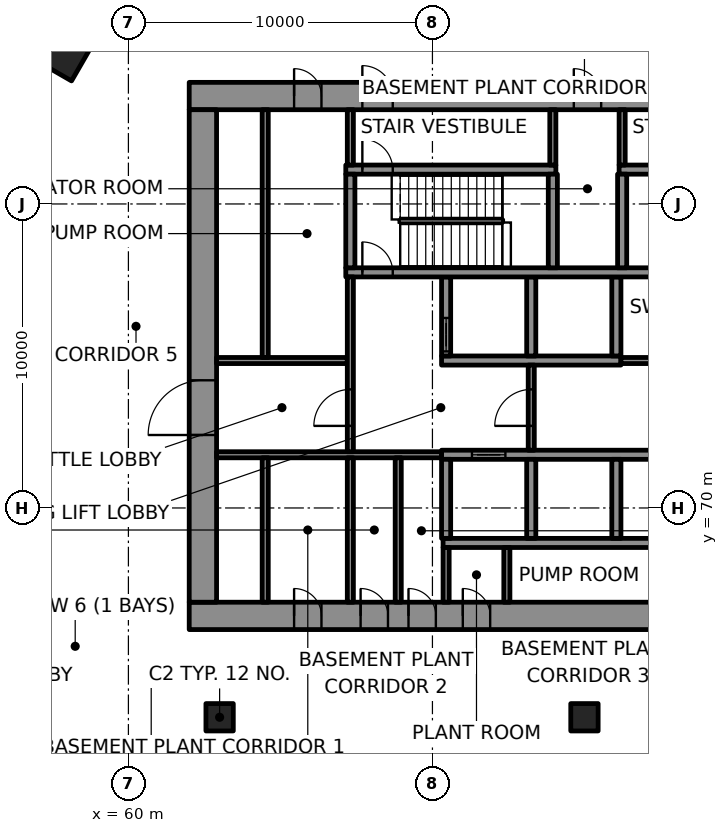
"""IFC4 building model, lengths in metres.
Left out: names, types, materials, properties, quantities, classifications, styles, units other than length and angle.
Written with IfcOpenShell. Run it as: python <this file> out.ifc"""

import sys

from ifc_helpers import new_model, si_unit, direction, frame, frame_2d, origin, origin_2d, place, context, subcontext, project, spatial, rectangle, extrude, element, fill, save


model = new_model("IFC4")
c1 = context("Model", 3, precision=1e-05, world=origin(), true_north=direction((0.0, 1.0)))
c2 = subcontext(c1, "Body", "Model", "MODEL_VIEW")
j1 = project(units=[si_unit("LENGTHUNIT", "METRE"), si_unit("PLANEANGLEUNIT", "RADIAN")], contexts=[c1])
p1 = place(None, origin())
s1 = spatial("IfcSite", under=j1, at=p1, CompositionType="ELEMENT")
p2 = place(p1, origin())
s2 = spatial("IfcBuilding", under=s1, at=p2, CompositionType="ELEMENT")
p3 = place(p2, frame((0.0, 0.0, -9.5)))
s3 = spatial("IfcBuildingStorey", under=s2, at=p3, CompositionType="ELEMENT", Elevation=-9.5)
p4 = place(p3, frame((67.936, 110.334, -0.35), z_axis=(0.0, 0.0, 1.0), x_axis=(-0.499999089162, -0.866025929656, 0.0)))
e1 = element("IfcWall", 1, at=p4, inside=s3, PredefinedType="SOLIDWALL", context=c2, shape_type="SweptSolid", body=[
    extrude(rectangle(XDim=53.501, YDim=0.6, at=frame_2d((26.751, 0.0))), origin(), (0.0, 0.0, 1.0), 4.5),
])
p5 = place(p3, frame((57.78, 84.942, 0.0), z_axis=(0.0, 0.0, 1.0), x_axis=(-0.5, -0.866025403784, 0.0)))
e2 = element("IfcColumn", 2, at=p5, inside=s3, PredefinedType="COLUMN", context=c2, shape_type="SweptSolid", body=[
    extrude(rectangle(XDim=1.2, YDim=1.5, at=origin_2d()), origin(), (0.0, 0.0, 1.0), 4.5),
])
for number, where, z_axis, x_axis in (
    (3, (63.0, 63.115, 0.0), (0.0, 0.0, 1.0), (1.0, 0.0, 0.0)),
    (4, (75.0, 63.115, 0.0), (0.0, 0.0, 1.0), (1.0, 0.0, 0.0)),
):
    element("IfcColumn", number, at=place(p3, frame(where, z_axis=z_axis, x_axis=x_axis)), inside=s3, PredefinedType="COLUMN", context=c2, shape_type="SweptSolid", body=[
        extrude(rectangle(XDim=0.9, YDim=0.9, at=origin_2d()), origin(), (0.0, 0.0, 1.0), 4.5),
    ])
p6 = place(p3, frame((62.0, 66.45, 0.0), z_axis=(0.0, 0.0, 1.0), x_axis=(1.0, 0.0, 0.0)))
e5 = element("IfcWall", 5, at=p6, inside=s3, PredefinedType="SHEAR", context=c2, shape_type="SweptSolid", body=[
    extrude(rectangle(XDim=26.0, YDim=0.9, at=frame_2d((13.0, 0.0))), origin(), (0.0, 0.0, 1.0), 4.15),
])
p7 = place(p6, frame((3.45, 0.0, 0.0)))
e6 = element("IfcOpeningElement", 6, at=p7, cuts=e5, PredefinedType="OPENING", context=c2, shape_type="SweptSolid", body=[
    extrude(rectangle(XDim=0.9, YDim=2.1, at=frame_2d((0.45, 1.05))), frame((0.0, 0.46, 0.0), z_axis=(0.0, -1.0, 0.0), x_axis=(1.0, 0.0, 0.0)), (0.0, 0.0, 1.0), 0.92),
])
p8 = place(p6, frame((5.637, 0.0, 0.0)))
e7 = element("IfcOpeningElement", 7, at=p8, cuts=e5, PredefinedType="OPENING", context=c2, shape_type="SweptSolid", body=[
    extrude(rectangle(XDim=0.9, YDim=2.1, at=frame_2d((0.45, 1.05))), frame((0.0, 0.46, 0.0), z_axis=(0.0, -1.0, 0.0), x_axis=(1.0, 0.0, 0.0)), (0.0, 0.0, 1.0), 0.92),
])
p9 = place(p6, frame((7.212, 0.0, 0.0)))
e8 = element("IfcOpeningElement", 8, at=p9, cuts=e5, PredefinedType="OPENING", context=c2, shape_type="SweptSolid", body=[
    extrude(rectangle(XDim=0.9, YDim=2.1, at=frame_2d((0.45, 1.05))), frame((0.0, 0.46, 0.0), z_axis=(0.0, -1.0, 0.0), x_axis=(1.0, 0.0, 0.0)), (0.0, 0.0, 1.0), 0.92),
])
p10 = place(p6, frame((8.999, 0.0, 0.0)))
e9 = element("IfcOpeningElement", 9, at=p10, cuts=e5, PredefinedType="OPENING", context=c2, shape_type="SweptSolid", body=[
    extrude(rectangle(XDim=0.9, YDim=2.1, at=frame_2d((0.45, 1.05))), frame((0.0, 0.46, 0.0), z_axis=(0.0, -1.0, 0.0), x_axis=(1.0, 0.0, 0.0)), (0.0, 0.0, 1.0), 0.92),
])
p11 = place(p6, frame((17.324, 0.0, 0.0)))
e10 = element("IfcOpeningElement", 10, at=p11, cuts=e5, PredefinedType="OPENING", context=c2, shape_type="SweptSolid", body=[
    extrude(rectangle(XDim=0.9, YDim=2.1, at=frame_2d((0.45, 1.05))), frame((0.0, 0.46, 0.0), z_axis=(0.0, -1.0, 0.0), x_axis=(1.0, 0.0, 0.0)), (0.0, 0.0, 1.0), 0.92),
])
p12 = place(p3, frame((62.0, 83.55, 0.0), z_axis=(0.0, 0.0, 1.0), x_axis=(1.0, 0.0, 0.0)))
e11 = element("IfcWall", 11, at=p12, inside=s3, PredefinedType="SHEAR", context=c2, shape_type="SweptSolid", body=[
    extrude(rectangle(XDim=26.0, YDim=0.9, at=frame_2d((13.0, 0.0))), origin(), (0.0, 0.0, 1.0), 4.15),
])
p13 = place(p12, frame((5.695, 0.0, 0.0)))
e12 = element("IfcOpeningElement", 12, at=p13, cuts=e11, PredefinedType="OPENING", context=c2, shape_type="SweptSolid", body=[
    extrude(rectangle(XDim=1.0, YDim=2.1, at=frame_2d((0.5, 1.05))), frame((0.0, 0.46, 0.0), z_axis=(0.0, -1.0, 0.0), x_axis=(1.0, 0.0, 0.0)), (0.0, 0.0, 1.0), 0.92),
])
p14 = place(p12, frame((19.505, 0.0, 0.0)))
e13 = element("IfcOpeningElement", 13, at=p14, cuts=e11, PredefinedType="OPENING", context=c2, shape_type="SweptSolid", body=[
    extrude(rectangle(XDim=1.0, YDim=2.1, at=frame_2d((0.5, 1.05))), frame((0.0, 0.46, 0.0), z_axis=(0.0, -1.0, 0.0), x_axis=(1.0, 0.0, 0.0)), (0.0, 0.0, 1.0), 0.92),
])
p15 = place(p12, frame((3.45, 0.0, 0.0)))
e14 = element("IfcOpeningElement", 14, at=p15, cuts=e11, PredefinedType="OPENING", context=c2, shape_type="SweptSolid", body=[
    extrude(rectangle(XDim=0.9, YDim=2.1, at=frame_2d((0.45, 1.05))), frame((0.0, 0.46, 0.0), z_axis=(0.0, -1.0, 0.0), x_axis=(1.0, 0.0, 0.0)), (0.0, 0.0, 1.0), 0.92),
])
p16 = place(p12, frame((12.65, 0.0, 0.0)))
e15 = element("IfcOpeningElement", 15, at=p16, cuts=e11, PredefinedType="OPENING", context=c2, shape_type="SweptSolid", body=[
    extrude(rectangle(XDim=0.9, YDim=2.1, at=frame_2d((0.45, 1.05))), frame((0.0, 0.46, 0.0), z_axis=(0.0, -1.0, 0.0), x_axis=(1.0, 0.0, 0.0)), (0.0, 0.0, 1.0), 0.92),
])
p17 = place(p12, frame((22.55, 0.0, 0.0)))
e16 = element("IfcOpeningElement", 16, at=p17, cuts=e11, PredefinedType="OPENING", context=c2, shape_type="SweptSolid", body=[
    extrude(rectangle(XDim=0.9, YDim=2.1, at=frame_2d((0.45, 1.05))), frame((0.0, 0.46, 0.0), z_axis=(0.0, -1.0, 0.0), x_axis=(1.0, 0.0, 0.0)), (0.0, 0.0, 1.0), 0.92),
])
p18 = place(p3, frame((62.45, 66.9, 0.0), z_axis=(0.0, 0.0, 1.0), x_axis=(0.0, 1.0, 0.0)))
e17 = element("IfcWall", 17, at=p18, inside=s3, PredefinedType="SHEAR", context=c2, shape_type="SweptSolid", body=[
    extrude(rectangle(XDim=16.2, YDim=0.9, at=frame_2d((8.1, 0.0))), origin(), (0.0, 0.0, 1.0), 4.15),
])
p19 = place(p18, frame((5.5, 0.0, 0.0)))
e18 = element("IfcOpeningElement", 18, at=p19, cuts=e17, PredefinedType="OPENING", context=c2, shape_type="SweptSolid", body=[
    extrude(rectangle(XDim=1.8, YDim=2.1, at=frame_2d((0.9, 1.05))), frame((0.0, 0.46, 0.0), z_axis=(0.0, -1.0, 0.0), x_axis=(1.0, 0.0, 0.0)), (0.0, 0.0, 1.0), 0.92),
])
p20 = place(p3, frame((70.35, 68.85, 0.0), z_axis=(0.0, 0.0, 1.0), x_axis=(1.0, 0.0, 0.0)))
e19 = element("IfcWall", 19, at=p20, inside=s3, PredefinedType="SHEAR", context=c2, shape_type="SweptSolid", body=[
    extrude(rectangle(XDim=16.75, YDim=0.3, at=frame_2d((8.375, 0.0))), origin(), (0.0, 0.0, 1.0), 4.15),
])
p21 = place(p3, frame((70.3, 71.75, 0.0), z_axis=(0.0, 0.0, 1.0), x_axis=(1.0, 0.0, 0.0)))
e20 = element("IfcWall", 20, at=p21, inside=s3, PredefinedType="SHEAR", context=c2, shape_type="SweptSolid", body=[
    extrude(rectangle(XDim=16.8, YDim=0.3, at=frame_2d((8.4, 0.0))), origin(), (0.0, 0.0, 1.0), 4.15),
])
p22 = place(p21, frame((1.0, 0.0, 0.0)))
e21 = element("IfcOpeningElement", 21, at=p22, cuts=e20, PredefinedType="OPENING", context=c2, shape_type="SweptSolid", body=[
    extrude(rectangle(XDim=1.1, YDim=2.1, at=frame_2d((0.55, 1.05))), frame((0.0, 0.16, 0.0), z_axis=(0.0, -1.0, 0.0), x_axis=(1.0, 0.0, 0.0)), (0.0, 0.0, 1.0), 0.32),
])
p23 = place(p3, frame((70.3, 74.85, 0.0), z_axis=(0.0, 0.0, 1.0), x_axis=(1.0, 0.0, 0.0)))
e22 = element("IfcWall", 22, at=p23, inside=s3, PredefinedType="SHEAR", context=c2, shape_type="SweptSolid", body=[
    extrude(rectangle(XDim=5.9, YDim=0.3, at=frame_2d((2.95, 0.0))), origin(), (0.0, 0.0, 1.0), 4.15),
])
p24 = place(p3, frame((70.45, 69.0, 0.0), z_axis=(0.0, 0.0, 1.0), x_axis=(0.0, 1.0, 0.0)))
e23 = element("IfcWall", 23, at=p24, inside=s3, PredefinedType="SHEAR", context=c2, shape_type="SweptSolid", body=[
    extrude(rectangle(XDim=2.6, YDim=0.3, at=frame_2d((1.3, 0.0))), origin(), (0.0, 0.0, 1.0), 4.15),
])
p25 = place(p3, frame((70.45, 75.0, 0.0), z_axis=(0.0, 0.0, 1.0), x_axis=(0.0, 1.0, 0.0)))
e24 = element("IfcWall", 24, at=p25, inside=s3, PredefinedType="SHEAR", context=c2, shape_type="SweptSolid", body=[
    extrude(rectangle(XDim=2.6, YDim=0.3, at=frame_2d((1.3, 0.0))), origin(), (0.0, 0.0, 1.0), 4.15),
])
p26 = place(p25, frame((0.15, 0.0, 0.0)))
e25 = element("IfcOpeningElement", 25, at=p26, cuts=e24, PredefinedType="OPENING", context=c2, shape_type="SweptSolid", body=[
    extrude(rectangle(XDim=1.1, YDim=2.1, at=frame_2d((0.55, 1.05))), frame((0.0, 0.16, 0.0), z_axis=(0.0, -1.0, 0.0), x_axis=(1.0, 0.0, 0.0)), (0.0, 0.0, 1.0), 0.32),
])
for number, where, z_axis, x_axis in (
    (26, (73.25, 69.0, 0.0), (0.0, 0.0, 1.0), (0.0, 1.0, 0.0)),
    (27, (73.25, 75.0, 0.0), (0.0, 0.0, 1.0), (0.0, 1.0, 0.0)),
    (28, (76.05, 69.0, 0.0), (0.0, 0.0, 1.0), (0.0, 1.0, 0.0)),
    (29, (76.05, 75.0, 0.0), (0.0, 0.0, 1.0), (0.0, 1.0, 0.0)),
):
    element("IfcWall", number, at=place(p3, frame(where, z_axis=z_axis, x_axis=x_axis)), inside=s3, PredefinedType="SHEAR", context=c2, shape_type="SweptSolid", body=[
        extrude(rectangle(XDim=2.6, YDim=0.3, at=frame_2d((1.3, 0.0))), origin(), (0.0, 0.0, 1.0), 4.15),
    ])
p27 = place(p3, frame((67.15, 77.75, 0.0), z_axis=(0.0, 0.0, 1.0), x_axis=(1.0, 0.0, 0.0)))
e30 = element("IfcWall", 30, at=p27, inside=s3, PredefinedType="SHEAR", context=c2, shape_type="SweptSolid", body=[
    extrude(rectangle(XDim=19.95, YDim=0.3, at=frame_2d((9.975, 0.0))), origin(), (0.0, 0.0, 1.0), 4.15),
])
p28 = place(p27, frame((0.545, 0.0, 0.0)))
e31 = element("IfcOpeningElement", 31, at=p28, cuts=e30, PredefinedType="OPENING", context=c2, shape_type="SweptSolid", body=[
    extrude(rectangle(XDim=1.0, YDim=2.1, at=frame_2d((0.5, 1.05))), frame((0.0, 0.16, 0.0), z_axis=(0.0, -1.0, 0.0), x_axis=(1.0, 0.0, 0.0)), (0.0, 0.0, 1.0), 0.32),
])
p29 = place(p3, frame((67.15, 81.13, 0.0), z_axis=(0.0, 0.0, 1.0), x_axis=(1.0, 0.0, 0.0)))
e32 = element("IfcWall", 32, at=p29, inside=s3, PredefinedType="SHEAR", context=c2, shape_type="SweptSolid", body=[
    extrude(rectangle(XDim=6.91, YDim=0.3, at=frame_2d((3.455, 0.0))), origin(), (0.0, 0.0, 1.0), 4.15),
])
p30 = place(p29, frame((0.545, 0.0, 0.0)))
e33 = element("IfcOpeningElement", 33, at=p30, cuts=e32, PredefinedType="OPENING", context=c2, shape_type="SweptSolid", body=[
    extrude(rectangle(XDim=1.0, YDim=2.1, at=frame_2d((0.5, 1.05))), frame((0.0, 0.16, 0.0), z_axis=(0.0, -1.0, 0.0), x_axis=(1.0, 0.0, 0.0)), (0.0, 0.0, 1.0), 0.32),
])
p31 = place(p3, frame((76.14, 81.13, 0.0), z_axis=(0.0, 0.0, 1.0), x_axis=(1.0, 0.0, 0.0)))
e34 = element("IfcWall", 34, at=p31, inside=s3, PredefinedType="SHEAR", context=c2, shape_type="SweptSolid", body=[
    extrude(rectangle(XDim=6.86, YDim=0.3, at=frame_2d((3.43, 0.0))), origin(), (0.0, 0.0, 1.0), 4.15),
])
p32 = place(p31, frame((5.365, 0.0, 0.0)))
e35 = element("IfcOpeningElement", 35, at=p32, cuts=e34, PredefinedType="OPENING", context=c2, shape_type="SweptSolid", body=[
    extrude(rectangle(XDim=1.0, YDim=2.1, at=frame_2d((0.5, 1.05))), frame((0.0, 0.16, 0.0), z_axis=(0.0, -1.0, 0.0), x_axis=(1.0, 0.0, 0.0)), (0.0, 0.0, 1.0), 0.32),
])
for number, where, z_axis, x_axis in (
    (36, (67.3, 77.9, 0.0), (0.0, 0.0, 1.0), (0.0, 1.0, 0.0)),
    (37, (73.96, 77.9, 0.0), (0.0, 0.0, 1.0), (0.0, 1.0, 0.0)),
    (38, (76.24, 77.9, 0.0), (0.0, 0.0, 1.0), (0.0, 1.0, 0.0)),
):
    element("IfcWall", number, at=place(p3, frame(where, z_axis=z_axis, x_axis=x_axis)), inside=s3, PredefinedType="SHEAR", context=c2, shape_type="SweptSolid", body=[
        extrude(rectangle(XDim=3.08, YDim=0.3, at=frame_2d((1.54, 0.0))), origin(), (0.0, 0.0, 1.0), 4.15),
    ])
p33 = place(p3, frame((62.9, 71.75, 0.0), z_axis=(0.0, 0.0, 1.0), x_axis=(1.0, 0.0, 0.0)))
e39 = element("IfcWall", 39, at=p33, inside=s3, PredefinedType="PARTITIONING", context=c2, shape_type="SweptSolid", body=[
    extrude(rectangle(XDim=7.4, YDim=0.2, at=frame_2d((3.7, 0.0))), origin(), (0.0, 0.0, 1.0), 4.15),
])
p34 = place(p3, frame((62.9, 74.85, 0.0), z_axis=(0.0, 0.0, 1.0), x_axis=(1.0, 0.0, 0.0)))
e40 = element("IfcWall", 40, at=p34, inside=s3, PredefinedType="PARTITIONING", context=c2, shape_type="SweptSolid", body=[
    extrude(rectangle(XDim=4.3, YDim=0.2, at=frame_2d((2.15, 0.0))), origin(), (0.0, 0.0, 1.0), 4.15),
])
p35 = place(p3, frame((76.2, 74.85, 0.0), z_axis=(0.0, 0.0, 1.0), x_axis=(1.0, 0.0, 0.0)))
e41 = element("IfcWall", 41, at=p35, inside=s3, PredefinedType="PARTITIONING", context=c2, shape_type="SweptSolid", body=[
    extrude(rectangle(XDim=5.3, YDim=0.2, at=frame_2d((2.65, 0.0))), origin(), (0.0, 0.0, 1.0), 4.15),
])
p36 = place(p35, frame((2.2, 0.0, 0.0)))
e42 = element("IfcOpeningElement", 42, at=p36, cuts=e41, PredefinedType="OPENING", context=c2, shape_type="SweptSolid", body=[
    extrude(rectangle(XDim=0.9, YDim=2.1, at=frame_2d((0.45, 1.05))), frame((0.0, 0.11, 0.0), z_axis=(0.0, -1.0, 0.0), x_axis=(1.0, 0.0, 0.0)), (0.0, 0.0, 1.0), 0.22),
])
p37 = place(p3, frame((64.5, 66.9, 0.0), z_axis=(0.0, 0.0, 1.0), x_axis=(0.0, 1.0, 0.0)))
e43 = element("IfcWall", 43, at=p37, inside=s3, PredefinedType="PARTITIONING", context=c2, shape_type="SweptSolid", body=[
    extrude(rectangle(XDim=4.75, YDim=0.2, at=frame_2d((2.375, 0.0))), origin(), (0.0, 0.0, 1.0), 4.15),
])
p38 = place(p3, frame((64.5, 74.95, 0.0), z_axis=(0.0, 0.0, 1.0), x_axis=(0.0, 1.0, 0.0)))
e44 = element("IfcWall", 44, at=p38, inside=s3, PredefinedType="PARTITIONING", context=c2, shape_type="SweptSolid", body=[
    extrude(rectangle(XDim=8.15, YDim=0.2, at=frame_2d((4.075, 0.0))), origin(), (0.0, 0.0, 1.0), 4.15),
])
p39 = place(p3, frame((67.3, 66.9, 0.0), z_axis=(0.0, 0.0, 1.0), x_axis=(0.0, 1.0, 0.0)))
e45 = element("IfcWall", 45, at=p39, inside=s3, PredefinedType="PARTITIONING", context=c2, shape_type="SweptSolid", body=[
    extrude(rectangle(XDim=4.75, YDim=0.2, at=frame_2d((2.375, 0.0))), origin(), (0.0, 0.0, 1.0), 4.15),
])
p40 = place(p3, frame((67.3, 71.85, 0.0), z_axis=(0.0, 0.0, 1.0), x_axis=(0.0, 1.0, 0.0)))
e46 = element("IfcWall", 46, at=p40, inside=s3, PredefinedType="PARTITIONING", context=c2, shape_type="SweptSolid", body=[
    extrude(rectangle(XDim=5.75, YDim=0.2, at=frame_2d((2.875, 0.0))), origin(), (0.0, 0.0, 1.0), 4.15),
])
p41 = place(p40, frame((0.85, 0.0, 0.0)))
e47 = element("IfcOpeningElement", 47, at=p41, cuts=e46, PredefinedType="OPENING", context=c2, shape_type="SweptSolid", body=[
    extrude(rectangle(XDim=1.2, YDim=2.1, at=frame_2d((0.6, 1.05))), frame((0.0, 0.11, 0.0), z_axis=(0.0, -1.0, 0.0), x_axis=(1.0, 0.0, 0.0)), (0.0, 0.0, 1.0), 0.22),
])
p42 = place(p3, frame((67.3, 81.28, 0.0), z_axis=(0.0, 0.0, 1.0), x_axis=(0.0, 1.0, 0.0)))
e48 = element("IfcWall", 48, at=p42, inside=s3, PredefinedType="PARTITIONING", context=c2, shape_type="SweptSolid", body=[
    extrude(rectangle(XDim=1.82, YDim=0.2, at=frame_2d((0.91, 0.0))), origin(), (0.0, 0.0, 1.0), 4.15),
])
p43 = place(p3, frame((68.875, 66.9, 0.0), z_axis=(0.0, 0.0, 1.0), x_axis=(0.0, 1.0, 0.0)))
e49 = element("IfcWall", 49, at=p43, inside=s3, PredefinedType="PARTITIONING", context=c2, shape_type="SweptSolid", body=[
    extrude(rectangle(XDim=4.75, YDim=0.2, at=frame_2d((2.375, 0.0))), origin(), (0.0, 0.0, 1.0), 4.15),
])
for number, where, z_axis, x_axis in (
    (50, (70.45, 66.9, 0.0), (0.0, 0.0, 1.0), (0.0, 1.0, 0.0)),
    (51, (72.448, 66.9, 0.0), (0.0, 0.0, 1.0), (0.0, 1.0, 0.0)),
):
    element("IfcWall", number, at=place(p3, frame(where, z_axis=z_axis, x_axis=x_axis)), inside=s3, PredefinedType="PARTITIONING", context=c2, shape_type="SweptSolid", body=[
        extrude(rectangle(XDim=1.8, YDim=0.2, at=frame_2d((0.9, 0.0))), origin(), (0.0, 0.0, 1.0), 4.15),
    ])
p44 = place(p3, frame((73.25, 71.9, 0.0), z_axis=(0.0, 0.0, 1.0), x_axis=(0.0, 1.0, 0.0)))
e52 = element("IfcWall", 52, at=p44, inside=s3, PredefinedType="PARTITIONING", context=c2, shape_type="SweptSolid", body=[
    extrude(rectangle(XDim=2.8, YDim=0.2, at=frame_2d((1.4, 0.0))), origin(), (0.0, 0.0, 1.0), 4.15),
])
p45 = place(p44, frame((0.8, 0.0, 0.0)))
e53 = element("IfcOpeningElement", 53, at=p45, cuts=e52, PredefinedType="OPENING", context=c2, shape_type="SweptSolid", body=[
    extrude(rectangle(XDim=1.2, YDim=2.1, at=frame_2d((0.6, 1.05))), frame((0.0, 0.11, 0.0), z_axis=(0.0, -1.0, 0.0), x_axis=(1.0, 0.0, 0.0)), (0.0, 0.0, 1.0), 0.22),
])
for number, where, z_axis, x_axis in (
    (54, (73.96, 81.28, 0.0), (0.0, 0.0, 1.0), (0.0, 1.0, 0.0)),
    (55, (76.24, 81.28, 0.0), (0.0, 0.0, 1.0), (0.0, 1.0, 0.0)),
):
    element("IfcWall", number, at=place(p3, frame(where, z_axis=z_axis, x_axis=x_axis)), inside=s3, PredefinedType="PARTITIONING", context=c2, shape_type="SweptSolid", body=[
        extrude(rectangle(XDim=1.82, YDim=0.2, at=frame_2d((0.91, 0.0))), origin(), (0.0, 0.0, 1.0), 4.15),
    ])
p46 = place(p22, origin())
e56 = element("IfcDoor", 56, at=p46, inside=s3, OperationType="DOUBLE_DOOR_SLIDING", PredefinedType="DOOR", context=c2, shape_type="SweptSolid", body=[
    extrude(rectangle(XDim=1.1, YDim=2.1, at=frame_2d((0.55, 1.05))), frame((0.0, 0.025, 0.0), z_axis=(0.0, -1.0, 0.0), x_axis=(1.0, 0.0, 0.0)), (0.0, 0.0, 1.0), 0.05),
])
fill(e21, e56)
p47 = place(p26, origin())
e57 = element("IfcDoor", 57, at=p47, inside=s3, OperationType="DOUBLE_DOOR_SLIDING", PredefinedType="DOOR", context=c2, shape_type="SweptSolid", body=[
    extrude(rectangle(XDim=1.1, YDim=2.1, at=frame_2d((0.55, 1.05))), frame((0.0, 0.025, 0.0), z_axis=(0.0, -1.0, 0.0), x_axis=(1.0, 0.0, 0.0)), (0.0, 0.0, 1.0), 0.05),
])
fill(e25, e57)
p48 = place(p28, origin())
e58 = element("IfcDoor", 58, at=p48, inside=s3, OperationType="SINGLE_SWING_LEFT", PredefinedType="DOOR", context=c2, shape_type="SweptSolid", body=[
    extrude(rectangle(XDim=1.0, YDim=2.1, at=frame_2d((0.5, 1.05))), frame((0.0, 0.025, 0.0), z_axis=(0.0, -1.0, 0.0), x_axis=(1.0, 0.0, 0.0)), (0.0, 0.0, 1.0), 0.05),
])
fill(e31, e58)
p49 = place(p30, origin())
e59 = element("IfcDoor", 59, at=p49, inside=s3, OperationType="SINGLE_SWING_RIGHT", PredefinedType="DOOR", context=c2, shape_type="SweptSolid", body=[
    extrude(rectangle(XDim=1.0, YDim=2.1, at=frame_2d((0.5, 1.05))), frame((0.0, 0.025, 0.0), z_axis=(0.0, -1.0, 0.0), x_axis=(1.0, 0.0, 0.0)), (0.0, 0.0, 1.0), 0.05),
])
fill(e33, e59)
p50 = place(p13, origin())
e60 = element("IfcDoor", 60, at=p50, inside=s3, OperationType="SINGLE_SWING_LEFT", PredefinedType="DOOR", context=c2, shape_type="SweptSolid", body=[
    extrude(rectangle(XDim=1.0, YDim=2.1, at=frame_2d((0.5, 1.05))), frame((0.0, 0.17, 0.0), z_axis=(0.0, -1.0, 0.0), x_axis=(1.0, 0.0, 0.0)), (0.0, 0.0, 1.0), 0.34),
])
fill(e12, e60)
p51 = place(p45, origin())
e61 = element("IfcDoor", 61, at=p51, inside=s3, OperationType="SINGLE_SWING_LEFT", PredefinedType="DOOR", context=c2, shape_type="SweptSolid", body=[
    extrude(rectangle(XDim=1.2, YDim=2.1, at=frame_2d((0.6, 1.05))), frame((0.0, 0.025, 0.0), z_axis=(0.0, -1.0, 0.0), x_axis=(1.0, 0.0, 0.0)), (0.0, 0.0, 1.0), 0.05),
])
fill(e53, e61)
p52 = place(p41, origin())
e62 = element("IfcDoor", 62, at=p52, inside=s3, OperationType="SINGLE_SWING_RIGHT", PredefinedType="DOOR", context=c2, shape_type="SweptSolid", body=[
    extrude(rectangle(XDim=1.2, YDim=2.1, at=frame_2d((0.6, 1.05))), frame((0.0, 0.025, 0.0), z_axis=(0.0, -1.0, 0.0), x_axis=(1.0, 0.0, 0.0)), (0.0, 0.0, 1.0), 0.05),
])
fill(e47, e62)
p53 = place(p19, origin())
e63 = element("IfcDoor", 63, at=p53, inside=s3, OperationType="SINGLE_SWING_LEFT", PredefinedType="DOOR", context=c2, shape_type="SweptSolid", body=[
    extrude(rectangle(XDim=1.8, YDim=2.1, at=frame_2d((0.9, 1.05))), frame((0.0, 0.17, 0.0), z_axis=(0.0, -1.0, 0.0), x_axis=(1.0, 0.0, 0.0)), (0.0, 0.0, 1.0), 0.34),
])
fill(e18, e63)
p54 = place(p7, origin())
e64 = element("IfcDoor", 64, at=p54, inside=s3, OperationType="SINGLE_SWING_LEFT", PredefinedType="DOOR", context=c2, shape_type="SweptSolid", body=[
    extrude(rectangle(XDim=0.9, YDim=2.1, at=frame_2d((0.45, 1.05))), frame((0.0, 0.17, 0.0), z_axis=(0.0, -1.0, 0.0), x_axis=(1.0, 0.0, 0.0)), (0.0, 0.0, 1.0), 0.34),
])
fill(e6, e64)
p55 = place(p8, origin())
e65 = element("IfcDoor", 65, at=p55, inside=s3, OperationType="SINGLE_SWING_RIGHT", PredefinedType="DOOR", context=c2, shape_type="SweptSolid", body=[
    extrude(rectangle(XDim=0.9, YDim=2.1, at=frame_2d((0.45, 1.05))), frame((0.0, 0.17, 0.0), z_axis=(0.0, -1.0, 0.0), x_axis=(1.0, 0.0, 0.0)), (0.0, 0.0, 1.0), 0.34),
])
fill(e7, e65)
p56 = place(p9, origin())
e66 = element("IfcDoor", 66, at=p56, inside=s3, OperationType="SINGLE_SWING_LEFT", PredefinedType="DOOR", context=c2, shape_type="SweptSolid", body=[
    extrude(rectangle(XDim=0.9, YDim=2.1, at=frame_2d((0.45, 1.05))), frame((0.0, 0.17, 0.0), z_axis=(0.0, -1.0, 0.0), x_axis=(1.0, 0.0, 0.0)), (0.0, 0.0, 1.0), 0.34),
])
fill(e8, e66)
p57 = place(p10, origin())
e67 = element("IfcDoor", 67, at=p57, inside=s3, OperationType="SINGLE_SWING_RIGHT", PredefinedType="DOOR", context=c2, shape_type="SweptSolid", body=[
    extrude(rectangle(XDim=0.9, YDim=2.1, at=frame_2d((0.45, 1.05))), frame((0.0, 0.17, 0.0), z_axis=(0.0, -1.0, 0.0), x_axis=(1.0, 0.0, 0.0)), (0.0, 0.0, 1.0), 0.34),
])
fill(e9, e67)
p58 = place(p15, origin())
e68 = element("IfcDoor", 68, at=p58, inside=s3, OperationType="SINGLE_SWING_RIGHT", PredefinedType="DOOR", context=c2, shape_type="SweptSolid", body=[
    extrude(rectangle(XDim=0.9, YDim=2.1, at=frame_2d((0.45, 1.05))), frame((0.0, 0.17, 0.0), z_axis=(0.0, -1.0, 0.0), x_axis=(1.0, 0.0, 0.0)), (0.0, 0.0, 1.0), 0.34),
])
fill(e14, e68)
p59 = place(p16, origin())
e69 = element("IfcDoor", 69, at=p59, inside=s3, OperationType="SINGLE_SWING_RIGHT", PredefinedType="DOOR", context=c2, shape_type="SweptSolid", body=[
    extrude(rectangle(XDim=0.9, YDim=2.1, at=frame_2d((0.45, 1.05))), frame((0.0, 0.17, 0.0), z_axis=(0.0, -1.0, 0.0), x_axis=(1.0, 0.0, 0.0)), (0.0, 0.0, 1.0), 0.34),
])
fill(e15, e69)
save(model, sys.argv[1])
